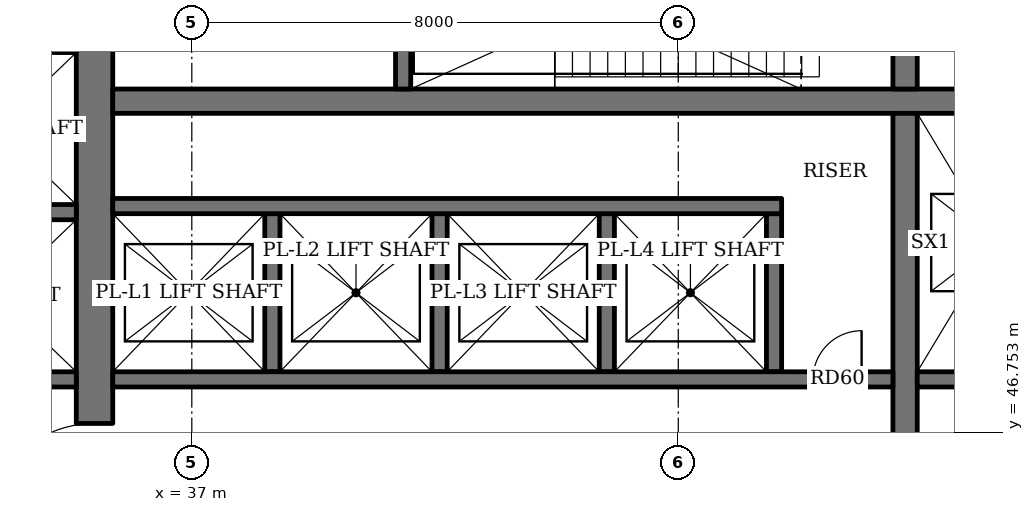
"""IFC4 building model, lengths in metres.
Left out: names, types, materials, properties, quantities, classifications, styles, units other than length and angle.
Written with IfcOpenShell. Run it as: python <this file> out.ifc"""

import sys

from ifc_helpers import new_model, si_unit, direction, frame, frame_2d, origin, place, context, subcontext, project, spatial, rectangle, extrude, element, fill, save


model = new_model("IFC4")
c1 = context("Model", 3, precision=1e-05, world=origin(), true_north=direction((0.0, 1.0)))
c2 = subcontext(c1, "Body", "Model", "MODEL_VIEW")
j1 = project(units=[si_unit("LENGTHUNIT", "METRE"), si_unit("PLANEANGLEUNIT", "RADIAN")], contexts=[c1])
p1 = place(None, origin())
s1 = spatial("IfcSite", under=j1, at=p1, CompositionType="ELEMENT")
p2 = place(p1, origin())
s2 = spatial("IfcBuilding", under=s1, at=p2, CompositionType="ELEMENT")
p3 = place(p2, frame((0.0, 0.0, 16.0)))
s3 = spatial("IfcBuildingStorey", under=s2, at=p3, CompositionType="ELEMENT", Elevation=16.0)
p4 = place(p3, frame((35.4, 36.7, 0.0), z_axis=(0.0, 0.0, 1.0), x_axis=(0.0, 1.0, 0.0)))
e1 = element("IfcWall", 1, at=p4, inside=s3, PredefinedType="SHEAR", context=c2, shape_type="SweptSolid", body=[
    extrude(rectangle(XDim=18.6, YDim=0.6, at=frame_2d((9.3, 0.0))), origin(), (0.0, 0.0, 1.0), 5.0),
])
p5 = place(p4, frame((8.4, 0.0, 0.0)))
e2 = element("IfcOpeningElement", 2, at=p5, cuts=e1, PredefinedType="OPENING", context=c2, shape_type="SweptSolid", body=[
    extrude(rectangle(XDim=1.8, YDim=2.4, at=frame_2d((0.9, 1.2))), frame((0.0, 0.31, 0.0), z_axis=(0.0, -1.0, 0.0), x_axis=(1.0, 0.0, 0.0)), (0.0, 0.0, 1.0), 0.62),
])
p6 = place(p3, frame((35.7, 52.2, 0.0), z_axis=(0.0, 0.0, 1.0), x_axis=(1.0, 0.0, 0.0)))
e3 = element("IfcWall", 3, at=p6, inside=s3, PredefinedType="SHEAR", context=c2, shape_type="SweptSolid", body=[
    extrude(rectangle(XDim=18.6, YDim=0.4, at=frame_2d((9.3, 0.0))), origin(), (0.0, 0.0, 1.0), 5.0),
])
p7 = place(p3, frame((48.73, 40.0, 0.0), z_axis=(0.0, 0.0, 1.0), x_axis=(0.0, 1.0, 0.0)))
e4 = element("IfcWall", 4, at=p7, inside=s3, PredefinedType="SHEAR", context=c2, shape_type="SweptSolid", body=[
    extrude(rectangle(XDim=12.0, YDim=0.4, at=frame_2d((6.0, 0.0))), origin(), (0.0, 0.0, 1.0), 5.0),
])
p8 = place(p3, frame((48.73, 52.4, 0.0), z_axis=(0.0, 0.0, 1.0), x_axis=(0.0, 1.0, 0.0)))
e5 = element("IfcWall", 5, at=p8, inside=s3, PredefinedType="SHEAR", context=c2, shape_type="SweptSolid", body=[
    extrude(rectangle(XDim=2.9, YDim=0.4, at=frame_2d((1.45, 0.0))), origin(), (0.0, 0.0, 1.0), 5.0),
])
p9 = place(p3, frame((40.475, 52.4, 0.0), z_axis=(0.0, 0.0, 1.0), x_axis=(0.0, 1.0, 0.0)))
e6 = element("IfcWall", 6, at=p9, inside=s3, PredefinedType="SHEAR", context=c2, shape_type="SweptSolid", body=[
    extrude(rectangle(XDim=2.9, YDim=0.25, at=frame_2d((1.45, 0.0))), origin(), (0.0, 0.0, 1.0), 5.0),
])
for number, where, z_axis, x_axis in (
    (7, (38.325, 47.75, 0.0), (0.0, 0.0, 1.0), (0.0, 1.0, 0.0)),
    (8, (41.075, 47.75, 0.0), (0.0, 0.0, 1.0), (0.0, 1.0, 0.0)),
    (9, (43.825, 47.75, 0.0), (0.0, 0.0, 1.0), (0.0, 1.0, 0.0)),
    (10, (46.575, 47.75, 0.0), (0.0, 0.0, 1.0), (0.0, 1.0, 0.0)),
):
    element("IfcWall", number, at=place(p3, frame(where, z_axis=z_axis, x_axis=x_axis)), inside=s3, PredefinedType="SHEAR", context=c2, shape_type="SweptSolid", body=[
        extrude(rectangle(XDim=2.6, YDim=0.25, at=frame_2d((1.3, 0.0))), origin(), (0.0, 0.0, 1.0), 5.0),
    ])
p10 = place(p3, frame((35.7, 50.475, 0.0), z_axis=(0.0, 0.0, 1.0), x_axis=(1.0, 0.0, 0.0)))
e11 = element("IfcWall", 11, at=p10, inside=s3, PredefinedType="SHEAR", context=c2, shape_type="SweptSolid", body=[
    extrude(rectangle(XDim=11.0, YDim=0.25, at=frame_2d((5.5, 0.0))), origin(), (0.0, 0.0, 1.0), 5.0),
])
p11 = place(p3, frame((35.7, 47.625, 0.0), z_axis=(0.0, 0.0, 1.0), x_axis=(1.0, 0.0, 0.0)))
e12 = element("IfcWall", 12, at=p11, inside=s3, PredefinedType="SHEAR", context=c2, shape_type="SweptSolid", body=[
    extrude(rectangle(XDim=12.83, YDim=0.25, at=frame_2d((6.415, 0.0))), origin(), (0.0, 0.0, 1.0), 5.0),
])
p12 = place(p11, frame((11.515, 0.0, 0.0)))
e13 = element("IfcOpeningElement", 13, at=p12, cuts=e12, PredefinedType="OPENING", context=c2, shape_type="SweptSolid", body=[
    extrude(rectangle(XDim=0.8, YDim=2.0, at=frame_2d((0.4, 1.0))), frame((0.0, 0.135, 0.0), z_axis=(0.0, -1.0, 0.0), x_axis=(1.0, 0.0, 0.0)), (0.0, 0.0, 1.0), 0.27),
])
p13 = place(p3, frame((48.93, 47.625, 0.0), z_axis=(0.0, 0.0, 1.0), x_axis=(1.0, 0.0, 0.0)))
e14 = element("IfcWall", 14, at=p13, inside=s3, PredefinedType="SHEAR", context=c2, shape_type="SweptSolid", body=[
    extrude(rectangle(XDim=5.37, YDim=0.25, at=frame_2d((2.685, 0.0))), origin(), (0.0, 0.0, 1.0), 5.0),
])
for number, where, z_axis, x_axis in (
    (15, (32.5, 47.625, 0.0), (0.0, 0.0, 1.0), (1.0, 0.0, 0.0)),
    (16, (32.5, 50.375, 0.0), (0.0, 0.0, 1.0), (1.0, 0.0, 0.0)),
):
    element("IfcWall", number, at=place(p3, frame(where, z_axis=z_axis, x_axis=x_axis)), inside=s3, PredefinedType="SHEAR", context=c2, shape_type="SweptSolid", body=[
        extrude(rectangle(XDim=2.6, YDim=0.25, at=frame_2d((1.3, 0.0))), origin(), (0.0, 0.0, 1.0), 5.0),
    ])
p14 = place(p12, origin())
e17 = element("IfcDoor", 17, at=p14, inside=s3, OperationType="SINGLE_SWING_RIGHT", PredefinedType="DOOR", context=c2, shape_type="SweptSolid", body=[
    extrude(rectangle(XDim=0.8, YDim=2.0, at=frame_2d((0.4, 1.0))), frame((0.0, 0.025, 0.0), z_axis=(0.0, -1.0, 0.0), x_axis=(1.0, 0.0, 0.0)), (0.0, 0.0, 1.0), 0.05),
])
fill(e13, e17)
p15 = place(p5, origin())
e18 = element("IfcDoor", 18, at=p15, inside=s3, OperationType="DOUBLE_DOOR_SINGLE_SWING", PredefinedType="DOOR", context=c2, shape_type="SweptSolid", body=[
    extrude(rectangle(XDim=1.8, YDim=2.4, at=frame_2d((0.9, 1.2))), frame((0.0, 0.025, 0.0), z_axis=(0.0, -1.0, 0.0), x_axis=(1.0, 0.0, 0.0)), (0.0, 0.0, 1.0), 0.05),
])
fill(e2, e18)
save(model, sys.argv[1])
